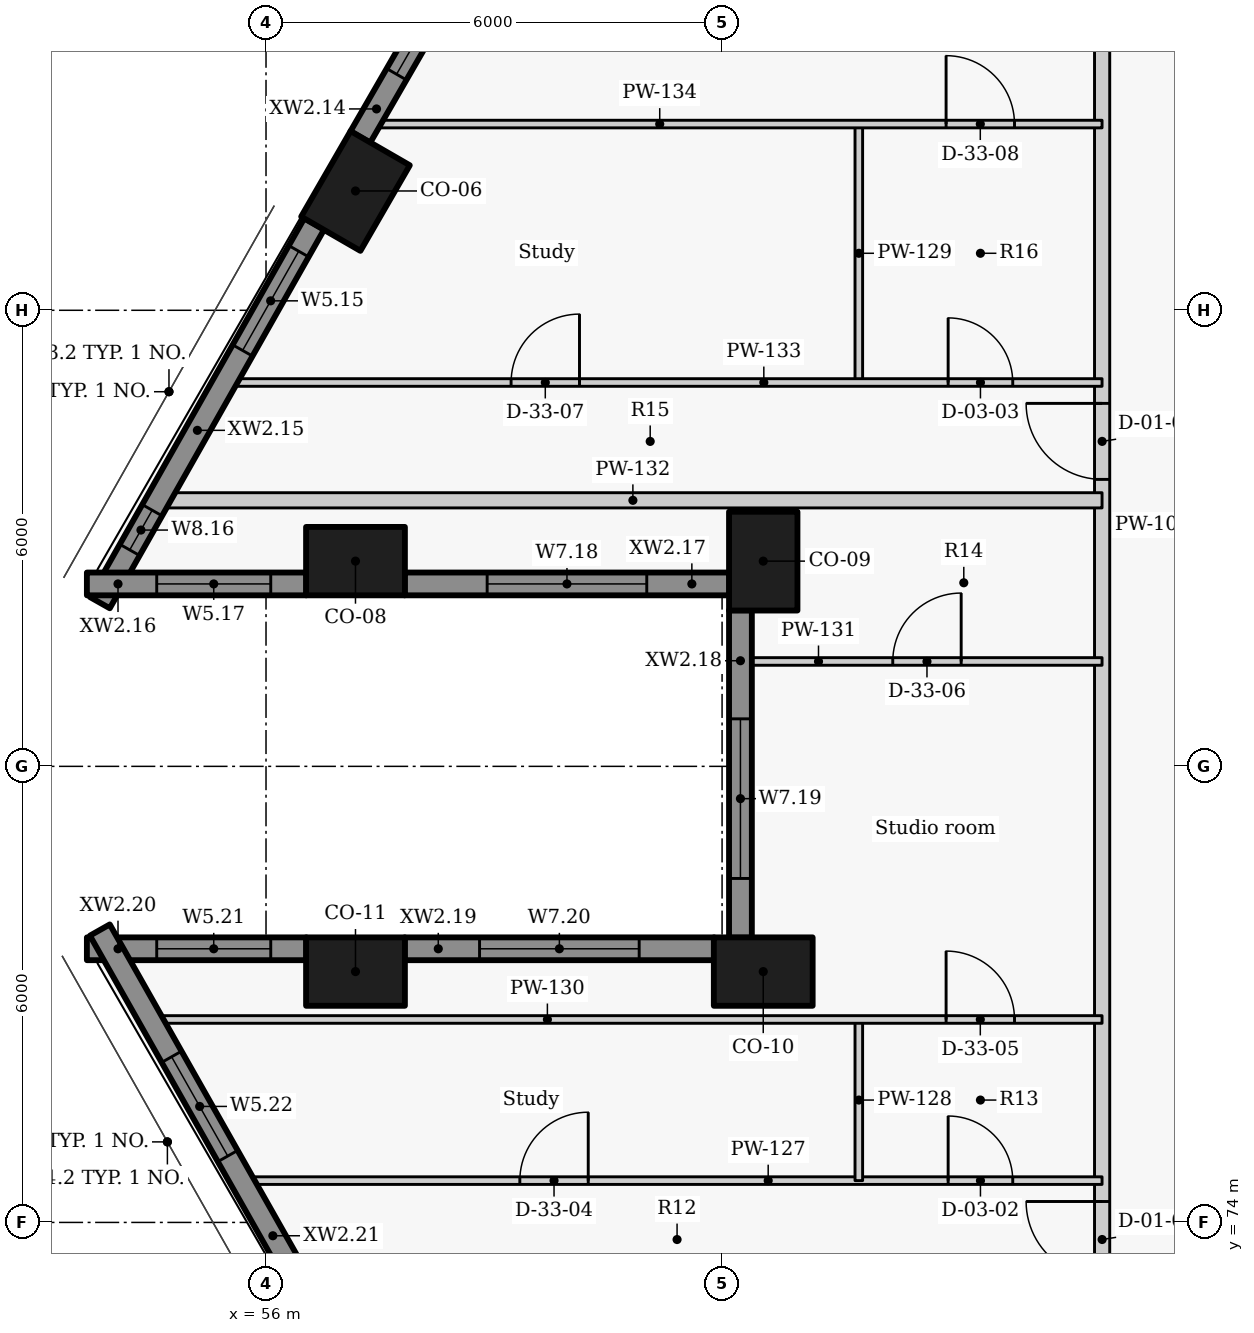
"""IFC4 building model, lengths in metres.
Left out: names, types, materials, properties, quantities, classifications, styles, units other than length and angle.
Written with IfcOpenShell. Run it as: python <this file> out.ifc"""

import sys

from ifc_helpers import new_model, si_unit, direction, frame, frame_2d, origin, origin_2d, place, context, subcontext, project, spatial, rectangle, extrude, element, fill, save


model = new_model("IFC4")
c1 = context("Model", 3, precision=1e-05, world=origin(), true_north=direction((0.0, 1.0)))
c2 = subcontext(c1, "Body", "Model", "MODEL_VIEW")
j1 = project(units=[si_unit("LENGTHUNIT", "METRE"), si_unit("PLANEANGLEUNIT", "RADIAN")], contexts=[c1])
p1 = place(None, origin())
s1 = spatial("IfcSite", under=j1, at=p1, CompositionType="ELEMENT")
p2 = place(p1, origin())
s2 = spatial("IfcBuilding", under=s1, at=p2, CompositionType="ELEMENT")
p3 = place(p2, frame((0.0, 0.0, 140.4)))
s3 = spatial("IfcBuildingStorey", under=s2, at=p3, CompositionType="ELEMENT", Elevation=140.4)
for number, where, z_axis, x_axis in (
    (1, (57.177, 87.57, 0.0), (0.0, 0.0, 1.0), (-0.5, -0.866, 0.0)),
    (2, (57.177, 82.7, 0.0), (0.0, 0.0, 1.0), (1.0, 0.0, 0.0)),
    (3, (62.542, 82.7, 0.0), (0.0, 0.0, 1.0), (0.0, -1.0, 0.0)),
    (4, (62.542, 77.3, 0.0), (0.0, 0.0, 1.0), (-1.0, 0.0, 0.0)),
    (5, (57.177, 77.3, 0.0), (0.0, 0.0, 1.0), (-1.0, 0.0, 0.0)),
):
    element("IfcColumn", number, at=place(p3, frame(where, z_axis=z_axis, x_axis=x_axis)), inside=s3, PredefinedType="COLUMN", context=c2, shape_type="SweptSolid", body=[
        extrude(rectangle(XDim=1.3, YDim=0.9, at=origin_2d()), origin(), (0.0, 0.0, 1.0), 3.3),
    ])
p4 = place(p3, frame((59.109, 91.515, 0.0), z_axis=(0.0, 0.0, 1.0), x_axis=(-0.499933594891, -0.866063739398, 0.0)))
e6 = element("IfcWall", 6, at=p4, inside=s3, PredefinedType="SOLIDWALL", context=c2, shape_type="SweptSolid", body=[
    extrude(rectangle(XDim=3.737, YDim=0.3, at=frame_2d((1.868, 0.0))), origin(), (0.0, 0.0, 1.0), 2.425),
])
p5 = place(p4, frame((0.683, 0.0, 0.9)))
e7 = element("IfcOpeningElement", 7, at=p5, cuts=e6, PredefinedType="OPENING", context=c2, shape_type="SweptSolid", body=[
    extrude(rectangle(XDim=2.1, YDim=1.1, at=frame_2d((1.05, 0.55))), frame((0.0, 0.16, 0.0), z_axis=(0.0, -1.0, 0.0), x_axis=(1.0, 0.0, 0.0)), (0.0, 0.0, 1.0), 0.32),
])
p6 = place(p3, frame((56.634, 87.137, 0.0), z_axis=(0.0, 0.0, 1.0), x_axis=(-0.492498306264, -0.87031340236, 0.0)))
e8 = element("IfcWall", 8, at=p6, inside=s3, PredefinedType="SOLIDWALL", context=c2, shape_type="SweptSolid", body=[
    extrude(rectangle(XDim=5.727, YDim=0.3, at=frame_2d((2.863, 0.0))), origin(), (0.0, 0.0, 1.0), 2.425),
])
p7 = place(p6, frame((0.414, 0.0, 0.9)))
e9 = element("IfcOpeningElement", 9, at=p7, cuts=e8, PredefinedType="OPENING", context=c2, shape_type="SweptSolid", body=[
    extrude(rectangle(XDim=1.5, YDim=1.1, at=frame_2d((0.75, 0.55))), frame((0.0, 0.16, 0.0), z_axis=(0.0, -1.0, 0.0), x_axis=(1.0, 0.0, 0.0)), (0.0, 0.0, 1.0), 0.32),
])
p8 = place(p6, frame((4.329, 0.0, 0.9)))
e10 = element("IfcOpeningElement", 10, at=p8, cuts=e8, PredefinedType="OPENING", context=c2, shape_type="SweptSolid", body=[
    extrude(rectangle(XDim=0.6, YDim=1.1, at=frame_2d((0.3, 0.55))), frame((0.0, 0.16, 0.0), z_axis=(0.0, -1.0, 0.0), x_axis=(1.0, 0.0, 0.0)), (0.0, 0.0, 1.0), 0.32),
])
p9 = place(p3, frame((53.643, 82.4, 0.0), z_axis=(0.0, 0.0, 1.0), x_axis=(1.0, 0.0, 0.0)))
e11 = element("IfcWall", 11, at=p9, inside=s3, PredefinedType="SOLIDWALL", context=c2, shape_type="SweptSolid", body=[
    extrude(rectangle(XDim=2.888, YDim=0.3, at=frame_2d((1.444, 0.0))), origin(), (0.0, 0.0, 1.0), 2.425),
])
p10 = place(p9, frame((0.919, 0.0, 0.9)))
e12 = element("IfcOpeningElement", 12, at=p10, cuts=e11, PredefinedType="OPENING", context=c2, shape_type="SweptSolid", body=[
    extrude(rectangle(XDim=1.5, YDim=1.1, at=frame_2d((0.75, 0.55))), frame((0.0, 0.16, 0.0), z_axis=(0.0, -1.0, 0.0), x_axis=(1.0, 0.0, 0.0)), (0.0, 0.0, 1.0), 0.32),
])
p11 = place(p3, frame((57.823, 82.4, 0.0), z_axis=(0.0, 0.0, 1.0), x_axis=(1.0, 0.0, 0.0)))
e13 = element("IfcWall", 13, at=p11, inside=s3, PredefinedType="SOLIDWALL", context=c2, shape_type="SweptSolid", body=[
    extrude(rectangle(XDim=4.273, YDim=0.3, at=frame_2d((2.136, 0.0))), origin(), (0.0, 0.0, 1.0), 2.425),
])
p12 = place(p11, frame((1.086, 0.0, 0.9)))
e14 = element("IfcOpeningElement", 14, at=p12, cuts=e13, PredefinedType="OPENING", context=c2, shape_type="SweptSolid", body=[
    extrude(rectangle(XDim=2.1, YDim=1.1, at=frame_2d((1.05, 0.55))), frame((0.0, 0.16, 0.0), z_axis=(0.0, -1.0, 0.0), x_axis=(1.0, 0.0, 0.0)), (0.0, 0.0, 1.0), 0.32),
])
p13 = place(p3, frame((62.242, 82.054, 0.0), z_axis=(0.0, 0.0, 1.0), x_axis=(0.0, -1.0, 0.0)))
e15 = element("IfcWall", 15, at=p13, inside=s3, PredefinedType="SOLIDWALL", context=c2, shape_type="SweptSolid", body=[
    extrude(rectangle(XDim=4.308, YDim=0.3, at=frame_2d((2.154, 0.0))), origin(), (0.0, 0.0, 1.0), 2.425),
])
p14 = place(p13, frame((1.429, 0.0, 0.9)))
e16 = element("IfcOpeningElement", 16, at=p14, cuts=e15, PredefinedType="OPENING", context=c2, shape_type="SweptSolid", body=[
    extrude(rectangle(XDim=2.1, YDim=1.1, at=frame_2d((1.05, 0.55))), frame((0.0, 0.16, 0.0), z_axis=(0.0, -1.0, 0.0), x_axis=(1.0, 0.0, 0.0)), (0.0, 0.0, 1.0), 0.32),
])
p15 = place(p3, frame((61.896, 77.6, 0.0), z_axis=(0.0, 0.0, 1.0), x_axis=(-1.0, 0.0, 0.0)))
e17 = element("IfcWall", 17, at=p15, inside=s3, PredefinedType="SOLIDWALL", context=c2, shape_type="SweptSolid", body=[
    extrude(rectangle(XDim=4.073, YDim=0.3, at=frame_2d((2.036, 0.0))), origin(), (0.0, 0.0, 1.0), 2.425),
])
p16 = place(p15, frame((0.986, 0.0, 0.9)))
e18 = element("IfcOpeningElement", 18, at=p16, cuts=e17, PredefinedType="OPENING", context=c2, shape_type="SweptSolid", body=[
    extrude(rectangle(XDim=2.1, YDim=1.1, at=frame_2d((1.05, 0.55))), frame((0.0, 0.16, 0.0), z_axis=(0.0, -1.0, 0.0), x_axis=(1.0, 0.0, 0.0)), (0.0, 0.0, 1.0), 0.32),
])
p17 = place(p3, frame((56.531, 77.6, 0.0), z_axis=(0.0, 0.0, 1.0), x_axis=(-1.0, 0.0, 0.0)))
e19 = element("IfcWall", 19, at=p17, inside=s3, PredefinedType="SOLIDWALL", context=c2, shape_type="SweptSolid", body=[
    extrude(rectangle(XDim=2.888, YDim=0.3, at=frame_2d((1.444, 0.0))), origin(), (0.0, 0.0, 1.0), 2.425),
])
p18 = place(p17, frame((0.469, 0.0, 0.9)))
e20 = element("IfcOpeningElement", 20, at=p18, cuts=e19, PredefinedType="OPENING", context=c2, shape_type="SweptSolid", body=[
    extrude(rectangle(XDim=1.5, YDim=1.1, at=frame_2d((0.75, 0.55))), frame((0.0, 0.16, 0.0), z_axis=(0.0, -1.0, 0.0), x_axis=(1.0, 0.0, 0.0)), (0.0, 0.0, 1.0), 0.32),
])
p19 = place(p3, frame((53.814, 77.847, 0.0), z_axis=(0.0, 0.0, 1.0), x_axis=(0.492498306264, -0.87031340236, 0.0)))
e21 = element("IfcWall", 21, at=p19, inside=s3, PredefinedType="SOLIDWALL", context=c2, shape_type="SweptSolid", body=[
    extrude(rectangle(XDim=5.727, YDim=0.3, at=frame_2d((2.863, 0.0))), origin(), (0.0, 0.0, 1.0), 2.425),
])
p20 = place(p19, frame((1.916, 0.0, 0.9)))
e22 = element("IfcOpeningElement", 22, at=p20, cuts=e21, PredefinedType="OPENING", context=c2, shape_type="SweptSolid", body=[
    extrude(rectangle(XDim=1.5, YDim=1.1, at=frame_2d((0.75, 0.55))), frame((0.0, 0.16, 0.0), z_axis=(0.0, -1.0, 0.0), x_axis=(1.0, 0.0, 0.0)), (0.0, 0.0, 1.0), 0.32),
])
p21 = place(p3, frame((67.0, 56.833, 0.0), z_axis=(0.0, 0.0, 1.0), x_axis=(0.0, 1.0, 0.0)))
e23 = element("IfcWall", 23, at=p21, inside=s3, PredefinedType="PARTITIONING", context=c2, shape_type="SweptSolid", body=[
    extrude(rectangle(XDim=45.661, YDim=0.2, at=frame_2d((22.831, 0.0))), origin(), (0.0, 0.0, 1.0), 2.405),
])
p22 = place(p21, frame((7.584, 0.0, 0.0)))
e24 = element("IfcOpeningElement", 24, at=p22, cuts=e23, PredefinedType="OPENING", context=c2, shape_type="SweptSolid", body=[
    extrude(rectangle(XDim=1.0, YDim=2.1, at=frame_2d((0.5, 1.05))), frame((0.0, 0.11, 0.0), z_axis=(0.0, -1.0, 0.0), x_axis=(1.0, 0.0, 0.0)), (0.0, 0.0, 1.0), 0.22),
])
p23 = place(p21, frame((16.442, 0.0, 0.0)))
e25 = element("IfcOpeningElement", 25, at=p23, cuts=e23, PredefinedType="OPENING", context=c2, shape_type="SweptSolid", body=[
    extrude(rectangle(XDim=1.0, YDim=2.1, at=frame_2d((0.5, 1.05))), frame((0.0, 0.11, 0.0), z_axis=(0.0, -1.0, 0.0), x_axis=(1.0, 0.0, 0.0)), (0.0, 0.0, 1.0), 0.22),
])
p24 = place(p21, frame((26.942, 0.0, 0.0)))
e26 = element("IfcOpeningElement", 26, at=p24, cuts=e23, PredefinedType="OPENING", context=c2, shape_type="SweptSolid", body=[
    extrude(rectangle(XDim=1.0, YDim=2.1, at=frame_2d((0.5, 1.05))), frame((0.0, 0.11, 0.0), z_axis=(0.0, -1.0, 0.0), x_axis=(1.0, 0.0, 0.0)), (0.0, 0.0, 1.0), 0.22),
])
p25 = place(p3, frame((55.78, 74.55, 0.0), z_axis=(0.0, 0.0, 1.0), x_axis=(1.0, 0.0, 0.0)))
e27 = element("IfcWall", 27, at=p25, inside=s3, PredefinedType="PARTITIONING", context=c2, shape_type="SweptSolid", body=[
    extrude(rectangle(XDim=11.219, YDim=0.1, at=frame_2d((5.609, 0.0))), origin(), (0.0, 0.0, 1.0), 2.405),
])
p26 = place(p25, frame((9.194, 0.0, 0.0)))
e28 = element("IfcOpeningElement", 28, at=p26, cuts=e27, PredefinedType="OPENING", context=c2, shape_type="SweptSolid", body=[
    extrude(rectangle(XDim=0.85, YDim=2.1, at=frame_2d((0.425, 1.05))), frame((0.0, 0.06, 0.0), z_axis=(0.0, -1.0, 0.0), x_axis=(1.0, 0.0, 0.0)), (0.0, 0.0, 1.0), 0.12),
])
p27 = place(p25, frame((3.559, 0.0, 0.0)))
e29 = element("IfcOpeningElement", 29, at=p27, cuts=e27, PredefinedType="OPENING", context=c2, shape_type="SweptSolid", body=[
    extrude(rectangle(XDim=0.9, YDim=2.1, at=frame_2d((0.45, 1.05))), frame((0.0, 0.06, 0.0), z_axis=(0.0, -1.0, 0.0), x_axis=(1.0, 0.0, 0.0)), (0.0, 0.0, 1.0), 0.12),
])
p28 = place(p3, frame((63.799, 74.55, 0.0), z_axis=(0.0, 0.0, 1.0), x_axis=(0.0, 1.0, 0.0)))
e30 = element("IfcWall", 30, at=p28, inside=s3, PredefinedType="PARTITIONING", context=c2, shape_type="SweptSolid", body=[
    extrude(rectangle(XDim=2.12, YDim=0.1, at=frame_2d((1.06, 0.0))), origin(), (0.0, 0.0, 1.0), 3.025),
])
p29 = place(p3, frame((63.799, 85.05, 0.0), z_axis=(0.0, 0.0, 1.0), x_axis=(0.0, 1.0, 0.0)))
e31 = element("IfcWall", 31, at=p29, inside=s3, PredefinedType="PARTITIONING", context=c2, shape_type="SweptSolid", body=[
    extrude(rectangle(XDim=3.4, YDim=0.1, at=frame_2d((1.7, 0.0))), origin(), (0.0, 0.0, 1.0), 3.025),
])
p30 = place(p3, frame((54.556, 76.67, 0.0), z_axis=(0.0, 0.0, 1.0), x_axis=(1.0, 0.0, 0.0)))
e32 = element("IfcWall", 32, at=p30, inside=s3, PredefinedType="PARTITIONING", context=c2, shape_type="SweptSolid", body=[
    extrude(rectangle(XDim=12.443, YDim=0.1, at=frame_2d((6.221, 0.0))), origin(), (0.0, 0.0, 1.0), 2.405),
])
p31 = place(p30, frame((10.391, 0.0, 0.0)))
e33 = element("IfcOpeningElement", 33, at=p31, cuts=e32, PredefinedType="OPENING", context=c2, shape_type="SweptSolid", body=[
    extrude(rectangle(XDim=0.9, YDim=2.1, at=frame_2d((0.45, 1.05))), frame((0.0, 0.06, 0.0), z_axis=(0.0, -1.0, 0.0), x_axis=(1.0, 0.0, 0.0)), (0.0, 0.0, 1.0), 0.12),
])
p32 = place(p3, frame((62.392, 81.38, 0.0), z_axis=(0.0, 0.0, 1.0), x_axis=(1.0, 0.0, 0.0)))
e34 = element("IfcWall", 34, at=p32, inside=s3, PredefinedType="PARTITIONING", context=c2, shape_type="SweptSolid", body=[
    extrude(rectangle(XDim=4.607, YDim=0.1, at=frame_2d((2.304, 0.0))), origin(), (0.0, 0.0, 1.0), 2.405),
])
p33 = place(p32, frame((1.854, 0.0, 0.0)))
e35 = element("IfcOpeningElement", 35, at=p33, cuts=e34, PredefinedType="OPENING", context=c2, shape_type="SweptSolid", body=[
    extrude(rectangle(XDim=0.9, YDim=2.1, at=frame_2d((0.45, 1.05))), frame((0.0, 0.06, 0.0), z_axis=(0.0, -1.0, 0.0), x_axis=(1.0, 0.0, 0.0)), (0.0, 0.0, 1.0), 0.12),
])
p34 = place(p3, frame((54.654, 83.5, 0.0), z_axis=(0.0, 0.0, 1.0), x_axis=(1.0, 0.0, 0.0)))
e36 = element("IfcWall", 36, at=p34, inside=s3, PredefinedType="PARTITIONING", context=c2, shape_type="SweptSolid", body=[
    extrude(rectangle(XDim=12.345, YDim=0.2, at=frame_2d((6.172, 0.0))), origin(), (0.0, 0.0, 1.0), 2.405),
])
p35 = place(p3, frame((55.549, 85.05, 0.0), z_axis=(0.0, 0.0, 1.0), x_axis=(1.0, 0.0, 0.0)))
e37 = element("IfcWall", 37, at=p35, inside=s3, PredefinedType="PARTITIONING", context=c2, shape_type="SweptSolid", body=[
    extrude(rectangle(XDim=11.45, YDim=0.1, at=frame_2d((5.725, 0.0))), origin(), (0.0, 0.0, 1.0), 2.405),
])
p36 = place(p35, frame((9.425, 0.0, 0.0)))
e38 = element("IfcOpeningElement", 38, at=p36, cuts=e37, PredefinedType="OPENING", context=c2, shape_type="SweptSolid", body=[
    extrude(rectangle(XDim=0.85, YDim=2.1, at=frame_2d((0.425, 1.05))), frame((0.0, 0.06, 0.0), z_axis=(0.0, -1.0, 0.0), x_axis=(1.0, 0.0, 0.0)), (0.0, 0.0, 1.0), 0.12),
])
p37 = place(p35, frame((3.675, 0.0, 0.0)))
e39 = element("IfcOpeningElement", 39, at=p37, cuts=e37, PredefinedType="OPENING", context=c2, shape_type="SweptSolid", body=[
    extrude(rectangle(XDim=0.9, YDim=2.1, at=frame_2d((0.45, 1.05))), frame((0.0, 0.06, 0.0), z_axis=(0.0, -1.0, 0.0), x_axis=(1.0, 0.0, 0.0)), (0.0, 0.0, 1.0), 0.12),
])
p38 = place(p3, frame((57.512, 88.45, 0.0), z_axis=(0.0, 0.0, 1.0), x_axis=(1.0, 0.0, 0.0)))
e40 = element("IfcWall", 40, at=p38, inside=s3, PredefinedType="PARTITIONING", context=c2, shape_type="SweptSolid", body=[
    extrude(rectangle(XDim=9.487, YDim=0.1, at=frame_2d((4.743, 0.0))), origin(), (0.0, 0.0, 1.0), 2.405),
])
p39 = place(p38, frame((7.435, 0.0, 0.0)))
e41 = element("IfcOpeningElement", 41, at=p39, cuts=e40, PredefinedType="OPENING", context=c2, shape_type="SweptSolid", body=[
    extrude(rectangle(XDim=0.9, YDim=2.1, at=frame_2d((0.45, 1.05))), frame((0.0, 0.06, 0.0), z_axis=(0.0, -1.0, 0.0), x_axis=(1.0, 0.0, 0.0)), (0.0, 0.0, 1.0), 0.12),
])
p40 = place(p5, origin())
e42 = element("IfcWindow", 42, at=p40, inside=s3, PartitioningType="SINGLE_PANEL", PredefinedType="WINDOW", context=c2, shape_type="SweptSolid", body=[
    extrude(rectangle(XDim=2.1, YDim=1.1, at=frame_2d((1.05, 0.55))), frame((0.0, 0.03, 0.0), z_axis=(0.0, -1.0, 0.0), x_axis=(1.0, 0.0, 0.0)), (0.0, 0.0, 1.0), 0.06),
])
fill(e7, e42)
p41 = place(p7, origin())
e43 = element("IfcWindow", 43, at=p41, inside=s3, PartitioningType="SINGLE_PANEL", PredefinedType="WINDOW", context=c2, shape_type="SweptSolid", body=[
    extrude(rectangle(XDim=1.5, YDim=1.1, at=frame_2d((0.75, 0.55))), frame((0.0, 0.03, 0.0), z_axis=(0.0, -1.0, 0.0), x_axis=(1.0, 0.0, 0.0)), (0.0, 0.0, 1.0), 0.06),
])
fill(e9, e43)
p42 = place(p8, origin())
e44 = element("IfcWindow", 44, at=p42, inside=s3, PartitioningType="SINGLE_PANEL", PredefinedType="WINDOW", context=c2, shape_type="SweptSolid", body=[
    extrude(rectangle(XDim=0.6, YDim=1.1, at=frame_2d((0.3, 0.55))), frame((0.0, 0.03, 0.0), z_axis=(0.0, -1.0, 0.0), x_axis=(1.0, 0.0, 0.0)), (0.0, 0.0, 1.0), 0.06),
])
fill(e10, e44)
p43 = place(p10, origin())
e45 = element("IfcWindow", 45, at=p43, inside=s3, PartitioningType="SINGLE_PANEL", PredefinedType="WINDOW", context=c2, shape_type="SweptSolid", body=[
    extrude(rectangle(XDim=1.5, YDim=1.1, at=frame_2d((0.75, 0.55))), frame((0.0, 0.03, 0.0), z_axis=(0.0, -1.0, 0.0), x_axis=(1.0, 0.0, 0.0)), (0.0, 0.0, 1.0), 0.06),
])
fill(e12, e45)
p44 = place(p12, origin())
e46 = element("IfcWindow", 46, at=p44, inside=s3, PartitioningType="SINGLE_PANEL", PredefinedType="WINDOW", context=c2, shape_type="SweptSolid", body=[
    extrude(rectangle(XDim=2.1, YDim=1.1, at=frame_2d((1.05, 0.55))), frame((0.0, 0.03, 0.0), z_axis=(0.0, -1.0, 0.0), x_axis=(1.0, 0.0, 0.0)), (0.0, 0.0, 1.0), 0.06),
])
fill(e14, e46)
p45 = place(p14, origin())
e47 = element("IfcWindow", 47, at=p45, inside=s3, PartitioningType="SINGLE_PANEL", PredefinedType="WINDOW", context=c2, shape_type="SweptSolid", body=[
    extrude(rectangle(XDim=2.1, YDim=1.1, at=frame_2d((1.05, 0.55))), frame((0.0, 0.03, 0.0), z_axis=(0.0, -1.0, 0.0), x_axis=(1.0, 0.0, 0.0)), (0.0, 0.0, 1.0), 0.06),
])
fill(e16, e47)
p46 = place(p16, origin())
e48 = element("IfcWindow", 48, at=p46, inside=s3, PartitioningType="SINGLE_PANEL", PredefinedType="WINDOW", context=c2, shape_type="SweptSolid", body=[
    extrude(rectangle(XDim=2.1, YDim=1.1, at=frame_2d((1.05, 0.55))), frame((0.0, 0.03, 0.0), z_axis=(0.0, -1.0, 0.0), x_axis=(1.0, 0.0, 0.0)), (0.0, 0.0, 1.0), 0.06),
])
fill(e18, e48)
p47 = place(p18, origin())
e49 = element("IfcWindow", 49, at=p47, inside=s3, PartitioningType="SINGLE_PANEL", PredefinedType="WINDOW", context=c2, shape_type="SweptSolid", body=[
    extrude(rectangle(XDim=1.5, YDim=1.1, at=frame_2d((0.75, 0.55))), frame((0.0, 0.03, 0.0), z_axis=(0.0, -1.0, 0.0), x_axis=(1.0, 0.0, 0.0)), (0.0, 0.0, 1.0), 0.06),
])
fill(e20, e49)
p48 = place(p20, origin())
e50 = element("IfcWindow", 50, at=p48, inside=s3, PartitioningType="SINGLE_PANEL", PredefinedType="WINDOW", context=c2, shape_type="SweptSolid", body=[
    extrude(rectangle(XDim=1.5, YDim=1.1, at=frame_2d((0.75, 0.55))), frame((0.0, 0.03, 0.0), z_axis=(0.0, -1.0, 0.0), x_axis=(1.0, 0.0, 0.0)), (0.0, 0.0, 1.0), 0.06),
])
fill(e22, e50)
p49 = place(p23, origin())
e51 = element("IfcDoor", 51, at=p49, inside=s3, OperationType="SINGLE_SWING_RIGHT", PredefinedType="DOOR", context=c2, shape_type="SweptSolid", body=[
    extrude(rectangle(XDim=1.0, YDim=2.1, at=frame_2d((0.5, 1.05))), frame((0.0, 0.025, 0.0), z_axis=(0.0, -1.0, 0.0), x_axis=(1.0, 0.0, 0.0)), (0.0, 0.0, 1.0), 0.05),
])
fill(e25, e51)
p50 = place(p26, origin())
e52 = element("IfcDoor", 52, at=p50, inside=s3, OperationType="SINGLE_SWING_LEFT", PredefinedType="DOOR", context=c2, shape_type="SweptSolid", body=[
    extrude(rectangle(XDim=0.85, YDim=2.1, at=frame_2d((0.425, 1.05))), frame((0.0, 0.025, 0.0), z_axis=(0.0, -1.0, 0.0), x_axis=(1.0, 0.0, 0.0)), (0.0, 0.0, 1.0), 0.05),
])
fill(e28, e52)
p51 = place(p27, origin())
e53 = element("IfcDoor", 53, at=p51, inside=s3, OperationType="SINGLE_SWING_RIGHT", PredefinedType="DOOR", context=c2, shape_type="SweptSolid", body=[
    extrude(rectangle(XDim=0.9, YDim=2.1, at=frame_2d((0.45, 1.05))), frame((0.0, 0.025, 0.0), z_axis=(0.0, -1.0, 0.0), x_axis=(1.0, 0.0, 0.0)), (0.0, 0.0, 1.0), 0.05),
])
fill(e29, e53)
p52 = place(p31, origin())
e54 = element("IfcDoor", 54, at=p52, inside=s3, OperationType="SINGLE_SWING_LEFT", PredefinedType="DOOR", context=c2, shape_type="SweptSolid", body=[
    extrude(rectangle(XDim=0.9, YDim=2.1, at=frame_2d((0.45, 1.05))), frame((0.0, 0.025, 0.0), z_axis=(0.0, -1.0, 0.0), x_axis=(1.0, 0.0, 0.0)), (0.0, 0.0, 1.0), 0.05),
])
fill(e33, e54)
p53 = place(p33, origin())
e55 = element("IfcDoor", 55, at=p53, inside=s3, OperationType="SINGLE_SWING_RIGHT", PredefinedType="DOOR", context=c2, shape_type="SweptSolid", body=[
    extrude(rectangle(XDim=0.9, YDim=2.1, at=frame_2d((0.45, 1.05))), frame((0.0, 0.025, 0.0), z_axis=(0.0, -1.0, 0.0), x_axis=(1.0, 0.0, 0.0)), (0.0, 0.0, 1.0), 0.05),
])
fill(e35, e55)
p54 = place(p24, origin())
e56 = element("IfcDoor", 56, at=p54, inside=s3, OperationType="SINGLE_SWING_RIGHT", PredefinedType="DOOR", context=c2, shape_type="SweptSolid", body=[
    extrude(rectangle(XDim=1.0, YDim=2.1, at=frame_2d((0.5, 1.05))), frame((0.0, 0.025, 0.0), z_axis=(0.0, -1.0, 0.0), x_axis=(1.0, 0.0, 0.0)), (0.0, 0.0, 1.0), 0.05),
])
fill(e26, e56)
p55 = place(p36, origin())
e57 = element("IfcDoor", 57, at=p55, inside=s3, OperationType="SINGLE_SWING_LEFT", PredefinedType="DOOR", context=c2, shape_type="SweptSolid", body=[
    extrude(rectangle(XDim=0.85, YDim=2.1, at=frame_2d((0.425, 1.05))), frame((0.0, 0.025, 0.0), z_axis=(0.0, -1.0, 0.0), x_axis=(1.0, 0.0, 0.0)), (0.0, 0.0, 1.0), 0.05),
])
fill(e38, e57)
p56 = place(p37, origin())
e58 = element("IfcDoor", 58, at=p56, inside=s3, OperationType="SINGLE_SWING_RIGHT", PredefinedType="DOOR", context=c2, shape_type="SweptSolid", body=[
    extrude(rectangle(XDim=0.9, YDim=2.1, at=frame_2d((0.45, 1.05))), frame((0.0, 0.025, 0.0), z_axis=(0.0, -1.0, 0.0), x_axis=(1.0, 0.0, 0.0)), (0.0, 0.0, 1.0), 0.05),
])
fill(e39, e58)
p57 = place(p39, origin())
e59 = element("IfcDoor", 59, at=p57, inside=s3, OperationType="SINGLE_SWING_LEFT", PredefinedType="DOOR", context=c2, shape_type="SweptSolid", body=[
    extrude(rectangle(XDim=0.9, YDim=2.1, at=frame_2d((0.45, 1.05))), frame((0.0, 0.025, 0.0), z_axis=(0.0, -1.0, 0.0), x_axis=(1.0, 0.0, 0.0)), (0.0, 0.0, 1.0), 0.05),
])
fill(e41, e59)
save(model, sys.argv[1])
